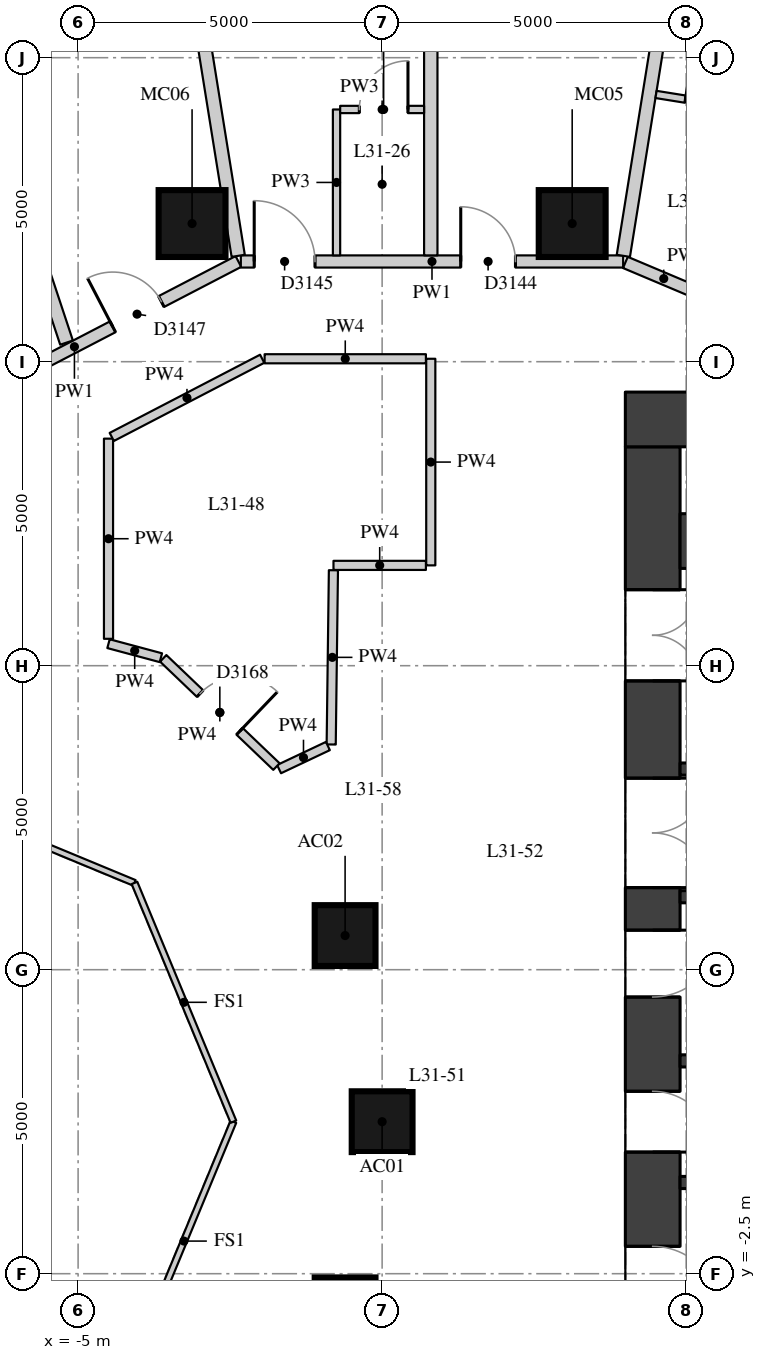
"""IFC4 building model, lengths in metres.
Left out: names, types, materials, properties, quantities, classifications, styles, units other than length and angle.
Written with IfcOpenShell. Run it as: python <this file> out.ifc"""

import sys

from ifc_helpers import new_model, si_unit, direction, frame, frame_2d, origin, origin_2d, place, context, subcontext, project, spatial, rectangle, extrude, element, fill, save


model = new_model("IFC4")
c1 = context("Model", 3, precision=1e-05, world=origin(), true_north=direction((0.0, 1.0)))
c2 = subcontext(c1, "Body", "Model", "MODEL_VIEW")
j1 = project(units=[si_unit("LENGTHUNIT", "METRE"), si_unit("PLANEANGLEUNIT", "RADIAN")], contexts=[c1])
p1 = place(None, origin())
s1 = spatial("IfcSite", under=j1, at=p1, CompositionType="ELEMENT")
p2 = place(p1, origin())
s2 = spatial("IfcBuilding", under=s1, at=p2, CompositionType="ELEMENT")
p3 = place(p2, frame((0.0, 0.0, 112.0)))
s3 = spatial("IfcBuildingStorey", under=s2, at=p3, CompositionType="ELEMENT", Elevation=112.0)
for number, where, z_axis, x_axis in (
    (1, (0.0, 0.0, 0.0), (0.0, 0.0, 1.0), (1.0, 0.0, 0.0)),
    (2, (-0.609, 3.062, 0.0), (0.0, 0.0, 1.0), (1.0, 0.0, 0.0)),
    (3, (-0.609, -3.062, 0.0), (0.0, 0.0, 1.0), (1.0, 0.0, 0.0)),
):
    element("IfcColumn", number, at=place(p3, frame(where, z_axis=z_axis, x_axis=x_axis)), inside=s3, PredefinedType="COLUMN", context=c2, shape_type="SweptSolid", body=[
        extrude(rectangle(XDim=1.0, YDim=1.0, at=origin_2d()), origin(), (0.0, 0.0, 1.0), 3.3),
    ])
for number, where, z_axis, x_axis in (
    (4, (3.126, 14.772, 0.0), (0.0, 0.0, 1.0), (1.0, 0.0, 0.0)),
    (5, (-3.126, 14.772, 0.0), (0.0, 0.0, 1.0), (1.0, 0.0, 0.0)),
):
    element("IfcColumn", number, at=place(p3, frame(where, z_axis=z_axis, x_axis=x_axis)), inside=s3, PredefinedType="COLUMN", context=c2, shape_type="SweptSolid", body=[
        extrude(rectangle(XDim=1.1, YDim=1.1, at=origin_2d()), origin(), (0.0, 0.0, 1.0), 3.3),
    ])
p4 = place(p3, frame((4.45, -11.1, 0.0), z_axis=(0.0, 0.0, 1.0), x_axis=(0.0, 1.0, 0.0)))
e6 = element("IfcWall", 6, at=p4, inside=s3, PredefinedType="SHEAR", context=c2, shape_type="SweptSolid", body=[
    extrude(rectangle(XDim=22.2, YDim=0.9, at=frame_2d((11.1, 0.0))), origin(), (0.0, 0.0, 1.0), 3.02),
])
p5 = place(p4, frame((2.35, 0.0, 0.0)))
e7 = element("IfcOpeningElement", 7, at=p5, cuts=e6, PredefinedType="OPENING", context=c2, shape_type="SweptSolid", body=[
    extrude(rectangle(XDim=1.5, YDim=2.1, at=frame_2d((0.75, 1.05))), frame((0.0, 0.46, 0.0), z_axis=(0.0, -1.0, 0.0), x_axis=(1.0, 0.0, 0.0)), (0.0, 0.0, 1.0), 0.92),
])
p6 = place(p4, frame((5.45, 0.0, 0.0)))
e8 = element("IfcOpeningElement", 8, at=p6, cuts=e6, PredefinedType="OPENING", context=c2, shape_type="SweptSolid", body=[
    extrude(rectangle(XDim=1.8, YDim=2.1, at=frame_2d((0.9, 1.05))), frame((0.0, 0.46, 0.0), z_axis=(0.0, -1.0, 0.0), x_axis=(1.0, 0.0, 0.0)), (0.0, 0.0, 1.0), 0.92),
])
p7 = place(p4, frame((7.95, 0.0, 0.0)))
e9 = element("IfcOpeningElement", 9, at=p7, cuts=e6, PredefinedType="OPENING", context=c2, shape_type="SweptSolid", body=[
    extrude(rectangle(XDim=1.1, YDim=2.1, at=frame_2d((0.55, 1.05))), frame((0.0, 0.46, 0.0), z_axis=(0.0, -1.0, 0.0), x_axis=(1.0, 0.0, 0.0)), (0.0, 0.0, 1.0), 0.92),
])
p8 = place(p4, frame((10.6, 0.0, 0.0)))
e10 = element("IfcOpeningElement", 10, at=p8, cuts=e6, PredefinedType="OPENING", context=c2, shape_type="SweptSolid", body=[
    extrude(rectangle(XDim=1.0, YDim=2.1, at=frame_2d((0.5, 1.05))), frame((0.0, 0.46, 0.0), z_axis=(0.0, -1.0, 0.0), x_axis=(1.0, 0.0, 0.0)), (0.0, 0.0, 1.0), 0.92),
])
p9 = place(p4, frame((13.15, 0.0, 0.0)))
e11 = element("IfcOpeningElement", 11, at=p9, cuts=e6, PredefinedType="OPENING", context=c2, shape_type="SweptSolid", body=[
    extrude(rectangle(XDim=1.1, YDim=2.1, at=frame_2d((0.55, 1.05))), frame((0.0, 0.46, 0.0), z_axis=(0.0, -1.0, 0.0), x_axis=(1.0, 0.0, 0.0)), (0.0, 0.0, 1.0), 0.92),
])
p10 = place(p4, frame((14.95, 0.0, 0.0)))
e12 = element("IfcOpeningElement", 12, at=p10, cuts=e6, PredefinedType="OPENING", context=c2, shape_type="SweptSolid", body=[
    extrude(rectangle(XDim=1.8, YDim=2.1, at=frame_2d((0.9, 1.05))), frame((0.0, 0.46, 0.0), z_axis=(0.0, -1.0, 0.0), x_axis=(1.0, 0.0, 0.0)), (0.0, 0.0, 1.0), 0.92),
])
p11 = place(p4, frame((18.35, 0.0, 0.0)))
e13 = element("IfcOpeningElement", 13, at=p11, cuts=e6, PredefinedType="OPENING", context=c2, shape_type="SweptSolid", body=[
    extrude(rectangle(XDim=1.5, YDim=2.1, at=frame_2d((0.75, 1.05))), frame((0.0, 0.46, 0.0), z_axis=(0.0, -1.0, 0.0), x_axis=(1.0, 0.0, 0.0)), (0.0, 0.0, 1.0), 0.92),
])
p12 = place(p3, frame((4.0, 11.55, 0.0), z_axis=(0.0, 0.0, 1.0), x_axis=(1.0, 0.0, 0.0)))
e14 = element("IfcWall", 14, at=p12, inside=s3, PredefinedType="SHEAR", context=c2, shape_type="SweptSolid", body=[
    extrude(rectangle(XDim=15.2, YDim=0.9, at=frame_2d((7.6, 0.0))), origin(), (0.0, 0.0, 1.0), 3.02),
])
p13 = place(p3, frame((4.9, 9.55, 0.0), z_axis=(0.0, 0.0, 1.0), x_axis=(1.0, 0.0, 0.0)))
e15 = element("IfcWall", 15, at=p13, inside=s3, PredefinedType="SHEAR", context=c2, shape_type="SweptSolid", body=[
    extrude(rectangle(XDim=10.2, YDim=0.9, at=frame_2d((5.1, 0.0))), origin(), (0.0, 0.0, 1.0), 3.02),
])
p14 = place(p3, frame((4.9, 5.8, 0.0), z_axis=(0.0, 0.0, 1.0), x_axis=(1.0, 0.0, 0.0)))
e16 = element("IfcWall", 16, at=p14, inside=s3, PredefinedType="SHEAR", context=c2, shape_type="SweptSolid", body=[
    extrude(rectangle(XDim=10.2, YDim=0.2, at=frame_2d((5.1, 0.0))), origin(), (0.0, 0.0, 1.0), 3.02),
])
p15 = place(p14, frame((6.75, 0.0, 0.0)))
e17 = element("IfcOpeningElement", 17, at=p15, cuts=e16, PredefinedType="OPENING", context=c2, shape_type="SweptSolid", body=[
    extrude(rectangle(XDim=1.1, YDim=2.1, at=frame_2d((0.55, 1.05))), frame((0.0, 0.11, 0.0), z_axis=(0.0, -1.0, 0.0), x_axis=(1.0, 0.0, 0.0)), (0.0, 0.0, 1.0), 0.22),
])
p16 = place(p14, frame((8.75, 0.0, 0.0)))
e18 = element("IfcOpeningElement", 18, at=p16, cuts=e16, PredefinedType="OPENING", context=c2, shape_type="SweptSolid", body=[
    extrude(rectangle(XDim=1.1, YDim=2.1, at=frame_2d((0.55, 1.05))), frame((0.0, 0.11, 0.0), z_axis=(0.0, -1.0, 0.0), x_axis=(1.0, 0.0, 0.0)), (0.0, 0.0, 1.0), 0.22),
])
p17 = place(p3, frame((4.9, 3.7, 0.0), z_axis=(0.0, 0.0, 1.0), x_axis=(1.0, 0.0, 0.0)))
e19 = element("IfcWall", 19, at=p17, inside=s3, PredefinedType="SHEAR", context=c2, shape_type="SweptSolid", body=[
    extrude(rectangle(XDim=10.2, YDim=0.2, at=frame_2d((5.1, 0.0))), origin(), (0.0, 0.0, 1.0), 3.02),
])
p18 = place(p17, frame((6.3, 0.0, 0.0)))
e20 = element("IfcOpeningElement", 20, at=p18, cuts=e19, PredefinedType="OPENING", context=c2, shape_type="SweptSolid", body=[
    extrude(rectangle(XDim=1.1, YDim=2.1, at=frame_2d((0.55, 1.05))), frame((0.0, 0.11, 0.0), z_axis=(0.0, -1.0, 0.0), x_axis=(1.0, 0.0, 0.0)), (0.0, 0.0, 1.0), 0.22),
])
p19 = place(p17, frame((8.6, 0.0, 0.0)))
e21 = element("IfcOpeningElement", 21, at=p19, cuts=e19, PredefinedType="OPENING", context=c2, shape_type="SweptSolid", body=[
    extrude(rectangle(XDim=1.1, YDim=2.1, at=frame_2d((0.55, 1.05))), frame((0.0, 0.11, 0.0), z_axis=(0.0, -1.0, 0.0), x_axis=(1.0, 0.0, 0.0)), (0.0, 0.0, 1.0), 0.22),
])
for number, where, z_axis, x_axis in (
    (22, (4.9, 1.0, 0.0), (0.0, 0.0, 1.0), (1.0, 0.0, 0.0)),
    (23, (4.9, -1.0, 0.0), (0.0, 0.0, 1.0), (1.0, 0.0, 0.0)),
):
    element("IfcWall", number, at=place(p3, frame(where, z_axis=z_axis, x_axis=x_axis)), inside=s3, PredefinedType="SHEAR", context=c2, shape_type="SweptSolid", body=[
        extrude(rectangle(XDim=10.2, YDim=0.2, at=frame_2d((5.1, 0.0))), origin(), (0.0, 0.0, 1.0), 3.02),
    ])
p20 = place(p3, frame((-7.757, 11.344, 0.0), z_axis=(0.0, 0.0, 1.0), x_axis=(0.887263483993, 0.461262951008, 0.0)))
e24 = element("IfcWall", 24, at=p20, inside=s3, PredefinedType="PARTITIONING", context=c2, shape_type="SweptSolid", body=[
    extrude(rectangle(XDim=6.079, YDim=0.2, at=frame_2d((3.04, 0.0))), origin(), (0.0, 0.0, 1.0), 3.02),
])
p21 = place(p20, frame((3.75, 0.0, 0.0)))
e25 = element("IfcOpeningElement", 25, at=p21, cuts=e24, PredefinedType="OPENING", context=c2, shape_type="SweptSolid", body=[
    extrude(rectangle(XDim=0.9, YDim=2.1, at=frame_2d((0.45, 1.05))), frame((0.0, 0.11, 0.0), z_axis=(0.0, -1.0, 0.0), x_axis=(1.0, 0.0, 0.0)), (0.0, 0.0, 1.0), 0.22),
])
p22 = place(p3, frame((-2.324, 14.148, 0.0), z_axis=(0.0, 0.0, 1.0), x_axis=(1.0, 0.0, 0.0)))
e26 = element("IfcWall", 26, at=p22, inside=s3, PredefinedType="PARTITIONING", context=c2, shape_type="SweptSolid", body=[
    extrude(rectangle(XDim=6.288, YDim=0.2, at=frame_2d((3.144, 0.0))), origin(), (0.0, 0.0, 1.0), 3.02),
])
p23 = place(p22, frame((3.617, 0.0, 0.0)))
e27 = element("IfcOpeningElement", 27, at=p23, cuts=e26, PredefinedType="OPENING", context=c2, shape_type="SweptSolid", body=[
    extrude(rectangle(XDim=0.9, YDim=2.1, at=frame_2d((0.45, 1.05))), frame((0.0, 0.11, 0.0), z_axis=(0.0, -1.0, 0.0), x_axis=(1.0, 0.0, 0.0)), (0.0, 0.0, 1.0), 0.22),
])
p24 = place(p22, frame((0.22, 0.0, 0.0)))
e28 = element("IfcOpeningElement", 28, at=p24, cuts=e26, PredefinedType="OPENING", context=c2, shape_type="SweptSolid", body=[
    extrude(rectangle(XDim=1.0, YDim=2.1, at=frame_2d((0.5, 1.05))), frame((0.0, 0.11, 0.0), z_axis=(0.0, -1.0, 0.0), x_axis=(1.0, 0.0, 0.0)), (0.0, 0.0, 1.0), 0.22),
])
p25 = place(p3, frame((4.0, 14.133, 0.0), z_axis=(0.0, 0.0, 1.0), x_axis=(0.921370144432, -0.388686322051, 0.0)))
e29 = element("IfcWall", 29, at=p25, inside=s3, PredefinedType="PARTITIONING", context=c2, shape_type="SweptSolid", body=[
    extrude(rectangle(XDim=1.37, YDim=0.2, at=frame_2d((0.685, 0.0))), origin(), (0.0, 0.0, 1.0), 3.02),
])
p26 = place(p3, frame((0.8, 12.548, 0.0), z_axis=(0.0, 0.0, 1.0), x_axis=(0.0, -1.0, 0.0)))
e30 = element("IfcWall", 30, at=p26, inside=s3, PredefinedType="PARTITIONING", context=c2, shape_type="SweptSolid", body=[
    extrude(rectangle(XDim=3.398, YDim=0.15, at=frame_2d((1.699, 0.0))), origin(), (0.0, 0.0, 1.0), 3.02),
])
p27 = place(p3, frame((0.72, 9.15, 0.0), z_axis=(0.0, 0.0, 1.0), x_axis=(-1.0, 0.0, 0.0)))
e31 = element("IfcWall", 31, at=p27, inside=s3, PredefinedType="PARTITIONING", context=c2, shape_type="SweptSolid", body=[
    extrude(rectangle(XDim=1.52, YDim=0.15, at=frame_2d((0.76, 0.0))), origin(), (0.0, 0.0, 1.0), 3.02),
])
p28 = place(p3, frame((-0.801, 9.07, 0.0), z_axis=(0.0, 0.0, 1.0), x_axis=(-0.012779053564, -0.999918344561, 0.0)))
e32 = element("IfcWall", 32, at=p28, inside=s3, PredefinedType="PARTITIONING", context=c2, shape_type="SweptSolid", body=[
    extrude(rectangle(XDim=2.866, YDim=0.15, at=frame_2d((1.433, 0.0))), origin(), (0.0, 0.0, 1.0), 3.02),
])
p29 = place(p3, frame((-0.892, 6.179, 0.0), z_axis=(0.0, 0.0, 1.0), x_axis=(-0.903944794982, -0.427649164181, 0.0)))
e33 = element("IfcWall", 33, at=p29, inside=s3, PredefinedType="PARTITIONING", context=c2, shape_type="SweptSolid", body=[
    extrude(rectangle(XDim=0.888, YDim=0.15, at=frame_2d((0.444, 0.0))), origin(), (0.0, 0.0, 1.0), 3.02),
])
p30 = place(p3, frame((-1.738, 5.841, 0.0), z_axis=(0.0, 0.0, 1.0), x_axis=(-0.722802374111, 0.691054793761, 0.0)))
e34 = element("IfcWall", 34, at=p30, inside=s3, PredefinedType="PARTITIONING", context=c2, shape_type="SweptSolid", body=[
    extrude(rectangle(XDim=2.576, YDim=0.15, at=frame_2d((1.288, 0.0))), origin(), (0.0, 0.0, 1.0), 3.02),
])
p31 = place(p30, frame((0.838, 0.0, 0.0)))
e35 = element("IfcOpeningElement", 35, at=p31, cuts=e34, PredefinedType="OPENING", context=c2, shape_type="SweptSolid", body=[
    extrude(rectangle(XDim=0.9, YDim=2.1, at=frame_2d((0.45, 1.05))), frame((0.0, 0.085, 0.0), z_axis=(0.0, -1.0, 0.0), x_axis=(1.0, 0.0, 0.0)), (0.0, 0.0, 1.0), 0.17),
])
p32 = place(p3, frame((-3.639, 7.631, 0.0), z_axis=(0.0, 0.0, 1.0), x_axis=(-0.965879594242, 0.258991523853, 0.0)))
e36 = element("IfcWall", 36, at=p32, inside=s3, PredefinedType="PARTITIONING", context=c2, shape_type="SweptSolid", body=[
    extrude(rectangle(XDim=0.892, YDim=0.15, at=frame_2d((0.446, 0.0))), origin(), (0.0, 0.0, 1.0), 3.02),
])
p33 = place(p3, frame((-4.5, 7.942, 0.0), z_axis=(0.0, 0.0, 1.0), x_axis=(0.0, 1.0, 0.0)))
e37 = element("IfcWall", 37, at=p33, inside=s3, PredefinedType="PARTITIONING", context=c2, shape_type="SweptSolid", body=[
    extrude(rectangle(XDim=3.292, YDim=0.15, at=frame_2d((1.646, 0.0))), origin(), (0.0, 0.0, 1.0), 3.02),
])
p34 = place(p3, frame((-4.447, 11.262, 0.0), z_axis=(0.0, 0.0, 1.0), x_axis=(0.887294207503, 0.461203847915, 0.0)))
e38 = element("IfcWall", 38, at=p34, inside=s3, PredefinedType="PARTITIONING", context=c2, shape_type="SweptSolid", body=[
    extrude(rectangle(XDim=2.788, YDim=0.15, at=frame_2d((1.394, 0.0))), origin(), (0.0, 0.0, 1.0), 3.02),
])
p35 = place(p3, frame((-1.933, 12.548, 0.0), z_axis=(0.0, 0.0, 1.0), x_axis=(1.0, 0.0, 0.0)))
e39 = element("IfcWall", 39, at=p35, inside=s3, PredefinedType="PARTITIONING", context=c2, shape_type="SweptSolid", body=[
    extrude(rectangle(XDim=2.653, YDim=0.15, at=frame_2d((1.326, 0.0))), origin(), (0.0, 0.0, 1.0), 3.02),
])
p36 = place(p3, frame((5.205, 21.95, 0.0), z_axis=(0.0, 0.0, 1.0), x_axis=(-0.158499016873, -0.987359135092, 0.0)))
e40 = element("IfcWall", 40, at=p36, inside=s3, PredefinedType="PARTITIONING", context=c2, shape_type="SweptSolid", body=[
    extrude(rectangle(XDim=7.808, YDim=0.22, at=frame_2d((3.904, 0.0))), origin(), (0.0, 0.0, 1.0), 3.02),
])
p37 = place(p3, frame((0.8, 22.3, 0.0), z_axis=(0.0, 0.0, 1.0), x_axis=(0.0, -1.0, 0.0)))
e41 = element("IfcWall", 41, at=p37, inside=s3, PredefinedType="PARTITIONING", context=c2, shape_type="SweptSolid", body=[
    extrude(rectangle(XDim=8.052, YDim=0.22, at=frame_2d((4.026, 0.0))), origin(), (0.0, 0.0, 1.0), 2.57),
])
p38 = place(p3, frame((-3.605, 21.95, 0.0), z_axis=(0.0, 0.0, 1.0), x_axis=(0.158529499426, -0.987354241299, 0.0)))
e42 = element("IfcWall", 42, at=p38, inside=s3, PredefinedType="PARTITIONING", context=c2, shape_type="SweptSolid", body=[
    extrude(rectangle(XDim=7.808, YDim=0.22, at=frame_2d((3.904, 0.0))), origin(), (0.0, 0.0, 1.0), 2.57),
])
p39 = place(p3, frame((-7.874, 20.912, 0.0), z_axis=(0.0, 0.0, 1.0), x_axis=(0.314561749761, -0.949237012335, 0.0)))
e43 = element("IfcWall", 43, at=p39, inside=s3, PredefinedType="PARTITIONING", context=c2, shape_type="SweptSolid", body=[
    extrude(rectangle(XDim=8.531, YDim=0.22, at=frame_2d((4.266, 0.0))), origin(), (0.0, 0.0, 1.0), 3.02),
])
p40 = place(p3, frame((-0.75, 14.248, 0.0), z_axis=(0.0, 0.0, 1.0), x_axis=(0.0, 1.0, 0.0)))
e44 = element("IfcWall", 44, at=p40, inside=s3, PredefinedType="PARTITIONING", context=c2, shape_type="SweptSolid", body=[
    extrude(rectangle(XDim=2.4, YDim=0.12, at=frame_2d((1.2, 0.0))), origin(), (0.0, 0.0, 1.0), 3.02),
])
p41 = place(p3, frame((6.311, 16.605, 0.0), z_axis=(0.0, 0.0, 1.0), x_axis=(-0.987336342922, 0.158640934018, 0.0)))
e45 = element("IfcWall", 45, at=p41, inside=s3, PredefinedType="PARTITIONING", context=c2, shape_type="SweptSolid", body=[
    extrude(rectangle(XDim=1.83, YDim=0.12, at=frame_2d((0.915, 0.0))), origin(), (0.0, 0.0, 1.0), 3.02),
])
p42 = place(p41, frame((0.54, 0.0, 0.0)))
e46 = element("IfcOpeningElement", 46, at=p42, cuts=e45, PredefinedType="OPENING", context=c2, shape_type="SweptSolid", body=[
    extrude(rectangle(XDim=0.8, YDim=2.1, at=frame_2d((0.4, 1.05))), frame((0.0, 0.07, 0.0), z_axis=(0.0, -1.0, 0.0), x_axis=(1.0, 0.0, 0.0)), (0.0, 0.0, 1.0), 0.14),
])
p43 = place(p3, frame((-0.69, 16.648, 0.0), z_axis=(0.0, 0.0, 1.0), x_axis=(1.0, 0.0, 0.0)))
e47 = element("IfcWall", 47, at=p43, inside=s3, PredefinedType="PARTITIONING", context=c2, shape_type="SweptSolid", body=[
    extrude(rectangle(XDim=1.38, YDim=0.12, at=frame_2d((0.69, 0.0))), origin(), (0.0, 0.0, 1.0), 3.02),
])
p44 = place(p43, frame((0.315, 0.0, 0.0)))
e48 = element("IfcOpeningElement", 48, at=p44, cuts=e47, PredefinedType="OPENING", context=c2, shape_type="SweptSolid", body=[
    extrude(rectangle(XDim=0.8, YDim=2.1, at=frame_2d((0.4, 1.05))), frame((0.0, 0.07, 0.0), z_axis=(0.0, -1.0, 0.0), x_axis=(1.0, 0.0, 0.0)), (0.0, 0.0, 1.0), 0.14),
])
for number, where, z_axis, x_axis in (
    (49, (-2.446, 0.0, 0.0), (0.0, 0.0, 1.0), (-0.383, -0.924, 0.0)),
    (50, (-8.0, 5.554, 0.0), (0.0, 0.0, 1.0), (0.924, -0.383, 0.0)),
    (51, (-4.073, 3.927, 0.0), (0.0, 0.0, 1.0), (0.383, -0.924, 0.0)),
):
    element("IfcWall", number, at=place(p3, frame(where, z_axis=z_axis, x_axis=x_axis)), inside=s3, PredefinedType="PARTITIONING", context=c2, shape_type="SweptSolid", body=[
        extrude(rectangle(XDim=4.251, YDim=0.1, at=frame_2d((2.125, 0.0))), origin(), (0.0, 0.0, 1.0), 3.02),
    ])
p45 = place(p7, origin())
e52 = element("IfcDoor", 52, at=p45, inside=s3, OperationType="SINGLE_SWING_RIGHT", PredefinedType="DOOR", context=c2, shape_type="SweptSolid", body=[
    extrude(rectangle(XDim=1.1, YDim=2.1, at=frame_2d((0.55, 1.05))), frame((0.0, 0.025, 0.0), z_axis=(0.0, -1.0, 0.0), x_axis=(1.0, 0.0, 0.0)), (0.0, 0.0, 1.0), 0.05),
])
fill(e9, e52)
p46 = place(p8, origin())
e53 = element("IfcDoor", 53, at=p46, inside=s3, OperationType="SINGLE_SWING_RIGHT", PredefinedType="DOOR", context=c2, shape_type="SweptSolid", body=[
    extrude(rectangle(XDim=1.0, YDim=2.1, at=frame_2d((0.5, 1.05))), frame((0.0, 0.025, 0.0), z_axis=(0.0, -1.0, 0.0), x_axis=(1.0, 0.0, 0.0)), (0.0, 0.0, 1.0), 0.05),
])
fill(e10, e53)
p47 = place(p9, origin())
e54 = element("IfcDoor", 54, at=p47, inside=s3, OperationType="SINGLE_SWING_LEFT", PredefinedType="DOOR", context=c2, shape_type="SweptSolid", body=[
    extrude(rectangle(XDim=1.1, YDim=2.1, at=frame_2d((0.55, 1.05))), frame((0.0, 0.025, 0.0), z_axis=(0.0, -1.0, 0.0), x_axis=(1.0, 0.0, 0.0)), (0.0, 0.0, 1.0), 0.05),
])
fill(e11, e54)
p48 = place(p10, origin())
e55 = element("IfcDoor", 55, at=p48, inside=s3, OperationType="DOUBLE_DOOR_SINGLE_SWING", PredefinedType="DOOR", context=c2, shape_type="SweptSolid", body=[
    extrude(rectangle(XDim=1.8, YDim=2.1, at=frame_2d((0.9, 1.05))), frame((0.0, 0.025, 0.0), z_axis=(0.0, -1.0, 0.0), x_axis=(1.0, 0.0, 0.0)), (0.0, 0.0, 1.0), 0.05),
])
fill(e12, e55)
p49 = place(p11, origin())
e56 = element("IfcDoor", 56, at=p49, inside=s3, OperationType="DOUBLE_DOOR_SINGLE_SWING", PredefinedType="DOOR", context=c2, shape_type="SweptSolid", body=[
    extrude(rectangle(XDim=1.5, YDim=2.1, at=frame_2d((0.75, 1.05))), frame((0.0, 0.025, 0.0), z_axis=(0.0, -1.0, 0.0), x_axis=(1.0, 0.0, 0.0)), (0.0, 0.0, 1.0), 0.05),
])
fill(e13, e56)
p50 = place(p42, origin())
e57 = element("IfcDoor", 57, at=p50, inside=s3, OperationType="SINGLE_SWING_LEFT", PredefinedType="DOOR", context=c2, shape_type="SweptSolid", body=[
    extrude(rectangle(XDim=0.8, YDim=2.1, at=frame_2d((0.4, 1.05))), frame((0.0, 0.025, 0.0), z_axis=(0.0, -1.0, 0.0), x_axis=(1.0, 0.0, 0.0)), (0.0, 0.0, 1.0), 0.05),
])
fill(e46, e57)
p51 = place(p23, origin())
e58 = element("IfcDoor", 58, at=p51, inside=s3, OperationType="SINGLE_SWING_LEFT", PredefinedType="DOOR", context=c2, shape_type="SweptSolid", body=[
    extrude(rectangle(XDim=0.9, YDim=2.1, at=frame_2d((0.45, 1.05))), frame((0.0, 0.025, 0.0), z_axis=(0.0, -1.0, 0.0), x_axis=(1.0, 0.0, 0.0)), (0.0, 0.0, 1.0), 0.05),
])
fill(e27, e58)
p52 = place(p24, origin())
e59 = element("IfcDoor", 59, at=p52, inside=s3, OperationType="SINGLE_SWING_LEFT", PredefinedType="DOOR", context=c2, shape_type="SweptSolid", body=[
    extrude(rectangle(XDim=1.0, YDim=2.1, at=frame_2d((0.5, 1.05))), frame((0.0, 0.025, 0.0), z_axis=(0.0, -1.0, 0.0), x_axis=(1.0, 0.0, 0.0)), (0.0, 0.0, 1.0), 0.05),
])
fill(e28, e59)
p53 = place(p44, origin())
e60 = element("IfcDoor", 60, at=p53, inside=s3, OperationType="SINGLE_SWING_RIGHT", PredefinedType="DOOR", context=c2, shape_type="SweptSolid", body=[
    extrude(rectangle(XDim=0.8, YDim=2.1, at=frame_2d((0.4, 1.05))), frame((0.0, 0.025, 0.0), z_axis=(0.0, -1.0, 0.0), x_axis=(1.0, 0.0, 0.0)), (0.0, 0.0, 1.0), 0.05),
])
fill(e48, e60)
p54 = place(p21, origin())
e61 = element("IfcDoor", 61, at=p54, inside=s3, OperationType="SINGLE_SWING_LEFT", PredefinedType="DOOR", context=c2, shape_type="SweptSolid", body=[
    extrude(rectangle(XDim=0.9, YDim=2.1, at=frame_2d((0.45, 1.05))), frame((0.0, 0.025, 0.0), z_axis=(0.0, -1.0, 0.0), x_axis=(1.0, 0.0, 0.0)), (0.0, 0.0, 1.0), 0.05),
])
fill(e25, e61)
p55 = place(p31, origin())
e62 = element("IfcDoor", 62, at=p55, inside=s3, OperationType="SINGLE_SWING_RIGHT", PredefinedType="DOOR", context=c2, shape_type="SweptSolid", body=[
    extrude(rectangle(XDim=0.9, YDim=2.1, at=frame_2d((0.45, 1.05))), frame((0.0, 0.025, 0.0), z_axis=(0.0, -1.0, 0.0), x_axis=(1.0, 0.0, 0.0)), (0.0, 0.0, 1.0), 0.05),
])
fill(e35, e62)
save(model, sys.argv[1])
